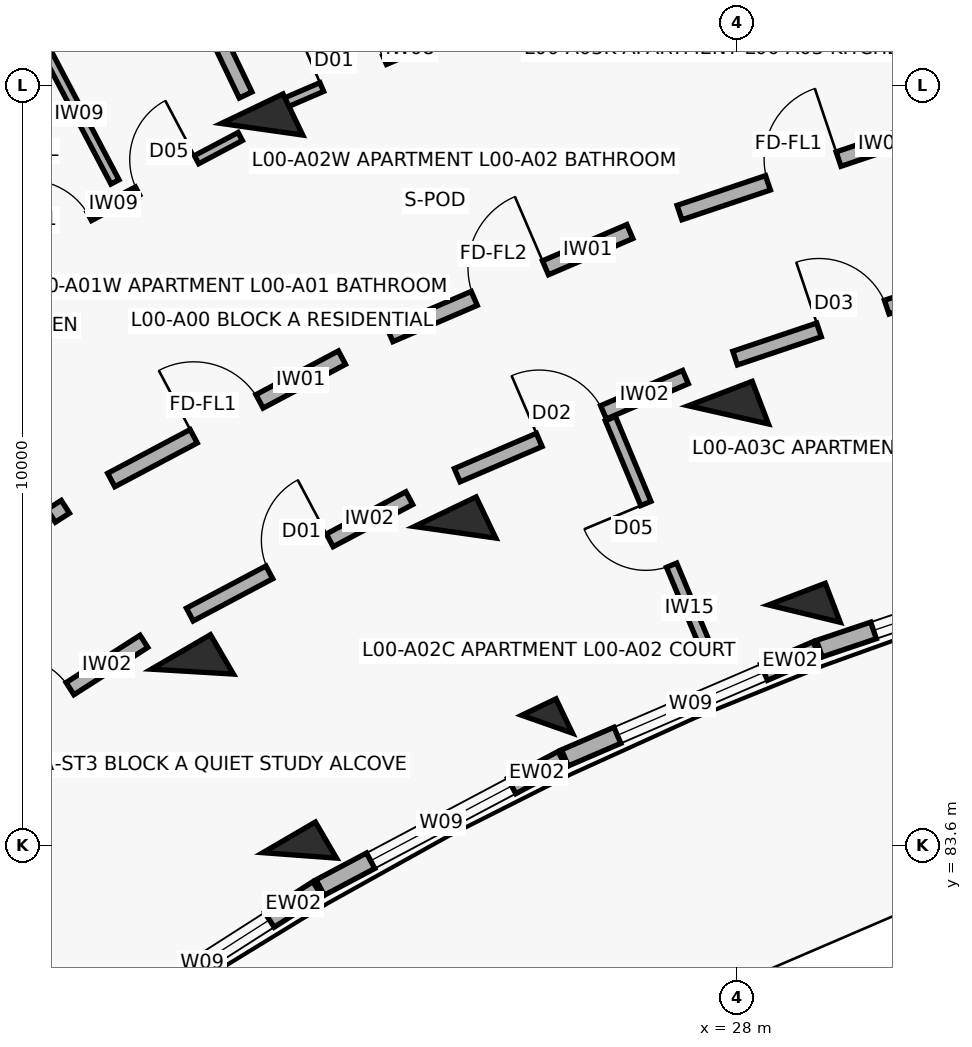
"""IFC4 building model, lengths in metres.
Left out: names, types, materials, properties, quantities, classifications, styles, units other than length and angle.
Written with IfcOpenShell. Run it as: python <this file> out.ifc"""

import sys

from ifc_helpers import new_model, si_unit, direction, frame, frame_2d, origin, origin_2d, place, context, subcontext, project, spatial, rectangle, extrude, element, fill, save


model = new_model("IFC4")
c1 = context("Model", 3, precision=1e-05, world=origin(), true_north=direction((0.0, 1.0)))
c2 = subcontext(c1, "Body", "Model", "MODEL_VIEW")
j1 = project(units=[si_unit("LENGTHUNIT", "METRE"), si_unit("PLANEANGLEUNIT", "RADIAN")], contexts=[c1])
p1 = place(None, origin())
s1 = spatial("IfcSite", under=j1, at=p1, CompositionType="ELEMENT")
p2 = place(p1, origin())
s2 = spatial("IfcBuilding", under=s1, at=p2, CompositionType="ELEMENT")
p3 = place(p2, origin())
s3 = spatial("IfcBuildingStorey", under=s2, at=p3, CompositionType="ELEMENT", Elevation=0.0)
p4 = place(p3, frame((22.249, 83.464, 0.0), z_axis=(0.0, 0.0, 1.0), x_axis=(-0.504226211181, 0.863571611366, 0.0)))
e1 = element("IfcColumn", 1, at=p4, inside=s3, PredefinedType="COLUMN", context=c2, shape_type="SweptSolid", body=[
    extrude(rectangle(XDim=0.55, YDim=0.8, at=origin_2d()), origin(), (0.0, 0.0, 1.0), 4.5),
])
p5 = place(p3, frame((20.837, 85.882, 0.0), z_axis=(0.0, 0.0, 1.0), x_axis=(-0.504226211181, 0.863571611366, 0.0)))
e2 = element("IfcColumn", 2, at=p5, inside=s3, PredefinedType="COLUMN", context=c2, shape_type="SweptSolid", body=[
    extrude(rectangle(XDim=0.6, YDim=0.9, at=origin_2d()), origin(), (0.0, 0.0, 1.0), 4.5),
])
p6 = place(p3, frame((25.504, 85.191, 0.0), z_axis=(0.0, 0.0, 1.0), x_axis=(-0.432085748802, 0.901832526405, 0.0)))
e3 = element("IfcColumn", 3, at=p6, inside=s3, PredefinedType="COLUMN", context=c2, shape_type="SweptSolid", body=[
    extrude(rectangle(XDim=0.5, YDim=0.5, at=origin_2d()), origin(), (0.0, 0.0, 1.0), 4.5),
])
for number, where, z_axis, x_axis in (
    (4, (24.294, 87.716, 0.0), (0.0, 0.0, 1.0), (-0.432, 0.902, 0.0)),
    (5, (21.754, 93.019, 0.0), (0.0, 0.0, 1.0), (-0.432, 0.902, 0.0)),
):
    element("IfcColumn", number, at=place(p3, frame(where, z_axis=z_axis, x_axis=x_axis)), inside=s3, PredefinedType="COLUMN", context=c2, shape_type="SweptSolid", body=[
        extrude(rectangle(XDim=0.6, YDim=0.9, at=origin_2d()), origin(), (0.0, 0.0, 1.0), 4.5),
    ])
p7 = place(p3, frame((28.889, 86.646, 0.0), z_axis=(0.0, 0.0, 1.0), x_axis=(-0.357064076459, 0.934079892355, 0.0)))
e6 = element("IfcColumn", 6, at=p7, inside=s3, PredefinedType="COLUMN", context=c2, shape_type="SweptSolid", body=[
    extrude(rectangle(XDim=0.55, YDim=0.8, at=origin_2d()), origin(), (0.0, 0.0, 1.0), 4.5),
])
p8 = place(p3, frame((27.889, 89.261, 0.0), z_axis=(0.0, 0.0, 1.0), x_axis=(-0.357064076459, 0.934079892355, 0.0)))
e7 = element("IfcColumn", 7, at=p8, inside=s3, PredefinedType="COLUMN", context=c2, shape_type="SweptSolid", body=[
    extrude(rectangle(XDim=0.6, YDim=0.9, at=origin_2d()), origin(), (0.0, 0.0, 1.0), 4.5),
])
p9 = place(p3, frame((19.449, 81.079, 0.0), z_axis=(0.0, 0.0, 1.0), x_axis=(0.84225540507, 0.539078688718, 0.0)))
e8 = element("IfcWall", 8, at=p9, inside=s3, PredefinedType="SOLIDWALL", context=c2, shape_type="SweptSolid", body=[
    extrude(rectangle(XDim=3.604, YDim=0.23, at=frame_2d((1.802, 0.0))), origin(), (0.0, 0.0, 1.0), 3.45),
])
p10 = place(p9, frame((0.752, 0.0, 0.32)))
e9 = element("IfcOpeningElement", 9, at=p10, cuts=e8, PredefinedType="OPENING", context=c2, shape_type="SweptSolid", body=[
    extrude(rectangle(XDim=2.1, YDim=1.65, at=frame_2d((1.05, 0.825))), frame((0.0, 0.125, 0.0), z_axis=(0.0, -1.0, 0.0), x_axis=(1.0, 0.0, 0.0)), (0.0, 0.0, 1.0), 0.25),
])
p11 = place(p3, frame((22.519, 83.042, 0.0), z_axis=(0.0, 0.0, 1.0), x_axis=(0.883438308286, 0.468547495407, 0.0)))
e10 = element("IfcWall", 10, at=p11, inside=s3, PredefinedType="SOLIDWALL", context=c2, shape_type="SweptSolid", body=[
    extrude(rectangle(XDim=3.604, YDim=0.23, at=frame_2d((1.802, 0.0))), origin(), (0.0, 0.0, 1.0), 3.45),
])
p12 = place(p11, frame((0.752, 0.0, 0.32)))
e11 = element("IfcOpeningElement", 11, at=p12, cuts=e10, PredefinedType="OPENING", context=c2, shape_type="SweptSolid", body=[
    extrude(rectangle(XDim=2.1, YDim=1.65, at=frame_2d((1.05, 0.825))), frame((0.0, 0.125, 0.0), z_axis=(0.0, -1.0, 0.0), x_axis=(1.0, 0.0, 0.0)), (0.0, 0.0, 1.0), 0.25),
])
p13 = place(p3, frame((25.739, 84.748, 0.0), z_axis=(0.0, 0.0, 1.0), x_axis=(0.918713438577, 0.394924825477, 0.0)))
e12 = element("IfcWall", 12, at=p13, inside=s3, PredefinedType="SOLIDWALL", context=c2, shape_type="SweptSolid", body=[
    extrude(rectangle(XDim=3.604, YDim=0.23, at=frame_2d((1.802, 0.0))), origin(), (0.0, 0.0, 1.0), 3.45),
])
p14 = place(p13, frame((0.752, 0.0, 0.32)))
e13 = element("IfcOpeningElement", 13, at=p14, cuts=e12, PredefinedType="OPENING", context=c2, shape_type="SweptSolid", body=[
    extrude(rectangle(XDim=2.1, YDim=1.65, at=frame_2d((1.05, 0.825))), frame((0.0, 0.125, 0.0), z_axis=(0.0, -1.0, 0.0), x_axis=(1.0, 0.0, 0.0)), (0.0, 0.0, 1.0), 0.25),
])
p15 = place(p3, frame((29.087, 86.185, 0.0), z_axis=(0.0, 0.0, 1.0), x_axis=(0.947880824442, 0.318625081649, 0.0)))
e14 = element("IfcWall", 14, at=p15, inside=s3, PredefinedType="SOLIDWALL", context=c2, shape_type="SweptSolid", body=[
    extrude(rectangle(XDim=3.604, YDim=0.23, at=frame_2d((1.802, 0.0))), origin(), (0.0, 0.0, 1.0), 3.45),
])
p16 = place(p15, frame((0.752, 0.0, 0.32)))
e15 = element("IfcOpeningElement", 15, at=p16, cuts=e14, PredefinedType="OPENING", context=c2, shape_type="SweptSolid", body=[
    extrude(rectangle(XDim=2.1, YDim=1.65, at=frame_2d((1.05, 0.825))), frame((0.0, 0.125, 0.0), z_axis=(0.0, -1.0, 0.0), x_axis=(1.0, 0.0, 0.0)), (0.0, 0.0, 1.0), 0.25),
])
p17 = place(p3, frame((16.272, 86.199, 0.0), z_axis=(0.0, 0.0, 1.0), x_axis=(0.842257205985, 0.539075874963, 0.0)))
e16 = element("IfcWall", 16, at=p17, inside=s3, PredefinedType="SOLIDWALL", context=c2, shape_type="SweptSolid", body=[
    extrude(rectangle(XDim=3.436, YDim=0.2, at=frame_2d((1.718, 0.0))), origin(), (0.0, 0.0, 1.0), 3.34),
])
p18 = place(p17, frame((0.28, 0.0, 0.0)))
e17 = element("IfcOpeningElement", 17, at=p18, cuts=e16, PredefinedType="OPENING", context=c2, shape_type="SweptSolid", body=[
    extrude(rectangle(XDim=1.12, YDim=2.15, at=frame_2d((0.56, 1.075))), frame((0.0, 0.11, 0.0), z_axis=(0.0, -1.0, 0.0), x_axis=(1.0, 0.0, 0.0)), (0.0, 0.0, 1.0), 0.22),
])
p19 = place(p17, frame((2.266, 0.0, 0.0)))
e18 = element("IfcOpeningElement", 18, at=p19, cuts=e16, PredefinedType="OPENING", context=c2, shape_type="SweptSolid", body=[
    extrude(rectangle(XDim=0.95, YDim=2.1, at=frame_2d((0.475, 1.05))), frame((0.0, 0.11, 0.0), z_axis=(0.0, -1.0, 0.0), x_axis=(1.0, 0.0, 0.0)), (0.0, 0.0, 1.0), 0.22),
])
p20 = place(p3, frame((17.447, 84.519, 0.0), z_axis=(0.0, 0.0, 1.0), x_axis=(0.842225276846, 0.539125758095, 0.0)))
e19 = element("IfcWall", 19, at=p20, inside=s3, PredefinedType="SOLIDWALL", context=c2, shape_type="SweptSolid", body=[
    extrude(rectangle(XDim=3.269, YDim=0.19, at=frame_2d((1.634, 0.0))), origin(), (0.0, 0.0, 1.0), 3.34),
])
p21 = place(p20, frame((1.154, 0.0, 0.0)))
e20 = element("IfcOpeningElement", 20, at=p21, cuts=e19, PredefinedType="OPENING", context=c2, shape_type="SweptSolid", body=[
    extrude(rectangle(XDim=0.96, YDim=2.1, at=frame_2d((0.48, 1.05))), frame((0.0, 0.105, 0.0), z_axis=(0.0, -1.0, 0.0), x_axis=(1.0, 0.0, 0.0)), (0.0, 0.0, 1.0), 0.21),
])
p22 = place(p3, frame((19.77, 88.404, 0.0), z_axis=(0.0, 0.0, 1.0), x_axis=(0.883410853063, 0.468599258099, 0.0)))
e21 = element("IfcWall", 21, at=p22, inside=s3, PredefinedType="SOLIDWALL", context=c2, shape_type="SweptSolid", body=[
    extrude(rectangle(XDim=3.436, YDim=0.2, at=frame_2d((1.718, 0.0))), origin(), (0.0, 0.0, 1.0), 3.34),
])
p23 = place(p22, frame((1.228, 0.0, 0.0)))
e22 = element("IfcOpeningElement", 22, at=p23, cuts=e21, PredefinedType="OPENING", context=c2, shape_type="SweptSolid", body=[
    extrude(rectangle(XDim=0.98, YDim=2.15, at=frame_2d((0.49, 1.075))), frame((0.0, 0.11, 0.0), z_axis=(0.0, -1.0, 0.0), x_axis=(1.0, 0.0, 0.0)), (0.0, 0.0, 1.0), 0.22),
])
p24 = place(p3, frame((20.804, 86.634, 0.0), z_axis=(0.0, 0.0, 1.0), x_axis=(0.883444301944, 0.468536194293, 0.0)))
e23 = element("IfcWall", 23, at=p24, inside=s3, PredefinedType="SOLIDWALL", context=c2, shape_type="SweptSolid", body=[
    extrude(rectangle(XDim=3.269, YDim=0.19, at=frame_2d((1.634, 0.0))), origin(), (0.0, 0.0, 1.0), 3.34),
])
p25 = place(p24, frame((1.184, 0.0, 0.0)))
e24 = element("IfcOpeningElement", 24, at=p25, cuts=e23, PredefinedType="OPENING", context=c2, shape_type="SweptSolid", body=[
    extrude(rectangle(XDim=0.9, YDim=2.1, at=frame_2d((0.45, 1.05))), frame((0.0, 0.105, 0.0), z_axis=(0.0, -1.0, 0.0), x_axis=(1.0, 0.0, 0.0)), (0.0, 0.0, 1.0), 0.21),
])
p26 = place(p3, frame((18.113, 91.144, 0.0), z_axis=(0.0, 0.0, 1.0), x_axis=(0.88341855112, 0.46858474531, 0.0)))
e25 = element("IfcWall", 25, at=p26, inside=s3, PredefinedType="PARTITIONING", context=c2, shape_type="SweptSolid", body=[
    extrude(rectangle(XDim=3.797, YDim=0.12, at=frame_2d((1.898, 0.0))), origin(), (0.0, 0.0, 1.0), 3.34),
])
p27 = place(p26, frame((0.65, 0.0, 0.0)))
e26 = element("IfcOpeningElement", 26, at=p27, cuts=e25, PredefinedType="OPENING", context=c2, shape_type="SweptSolid", body=[
    extrude(rectangle(XDim=0.9, YDim=2.1, at=frame_2d((0.45, 1.05))), frame((0.0, 0.07, 0.0), z_axis=(0.0, -1.0, 0.0), x_axis=(1.0, 0.0, 0.0)), (0.0, 0.0, 1.0), 0.14),
])
p28 = place(p26, frame((2.267, 0.0, 0.0)))
e27 = element("IfcOpeningElement", 27, at=p28, cuts=e25, PredefinedType="OPENING", context=c2, shape_type="SweptSolid", body=[
    extrude(rectangle(XDim=0.88, YDim=2.1, at=frame_2d((0.44, 1.05))), frame((0.0, 0.07, 0.0), z_axis=(0.0, -1.0, 0.0), x_axis=(1.0, 0.0, 0.0)), (0.0, 0.0, 1.0), 0.14),
])
p29 = place(p3, frame((19.819, 92.326, 0.0), z_axis=(0.0, 0.0, 1.0), x_axis=(-0.465849102717, 0.884864177995, 0.0)))
e28 = element("IfcWall", 28, at=p29, inside=s3, PredefinedType="PARTITIONING", context=c2, shape_type="SweptSolid", body=[
    extrude(rectangle(XDim=4.9, YDim=0.12, at=frame_2d((2.45, 0.0))), origin(), (0.0, 0.0, 1.0), 3.34),
])
p30 = place(p29, frame((2.025, 0.0, 0.0)))
e29 = element("IfcOpeningElement", 29, at=p30, cuts=e28, PredefinedType="OPENING", context=c2, shape_type="SweptSolid", body=[
    extrude(rectangle(XDim=0.85, YDim=2.1, at=frame_2d((0.425, 1.05))), frame((0.0, 0.07, 0.0), z_axis=(0.0, -1.0, 0.0), x_axis=(1.0, 0.0, 0.0)), (0.0, 0.0, 1.0), 0.14),
])
p31 = place(p3, frame((23.437, 90.316, 0.0), z_axis=(0.0, 0.0, 1.0), x_axis=(0.918718172399, 0.394913813008, 0.0)))
e30 = element("IfcWall", 30, at=p31, inside=s3, PredefinedType="SOLIDWALL", context=c2, shape_type="SweptSolid", body=[
    extrude(rectangle(XDim=3.436, YDim=0.2, at=frame_2d((1.718, 0.0))), origin(), (0.0, 0.0, 1.0), 3.34),
])
p32 = place(p31, frame((1.208, 0.0, 0.0)))
e31 = element("IfcOpeningElement", 31, at=p32, cuts=e30, PredefinedType="OPENING", context=c2, shape_type="SweptSolid", body=[
    extrude(rectangle(XDim=1.02, YDim=2.15, at=frame_2d((0.51, 1.075))), frame((0.0, 0.11, 0.0), z_axis=(0.0, -1.0, 0.0), x_axis=(1.0, 0.0, 0.0)), (0.0, 0.0, 1.0), 0.22),
])
p33 = place(p3, frame((24.322, 88.467, 0.0), z_axis=(0.0, 0.0, 1.0), x_axis=(0.918723391052, 0.394901672235, 0.0)))
e32 = element("IfcWall", 32, at=p33, inside=s3, PredefinedType="SOLIDWALL", context=c2, shape_type="SweptSolid", body=[
    extrude(rectangle(XDim=3.269, YDim=0.19, at=frame_2d((1.634, 0.0))), origin(), (0.0, 0.0, 1.0), 3.34),
])
p34 = place(p33, frame((1.174, 0.0, 0.0)))
e33 = element("IfcOpeningElement", 33, at=p34, cuts=e32, PredefinedType="OPENING", context=c2, shape_type="SweptSolid", body=[
    extrude(rectangle(XDim=0.92, YDim=2.1, at=frame_2d((0.46, 1.05))), frame((0.0, 0.105, 0.0), z_axis=(0.0, -1.0, 0.0), x_axis=(1.0, 0.0, 0.0)), (0.0, 0.0, 1.0), 0.21),
])
p35 = place(p3, frame((27.609, 86.166, 0.0), z_axis=(0.0, 0.0, 1.0), x_axis=(-0.385151143297, 0.922853507777, 0.0)))
e34 = element("IfcWall", 34, at=p35, inside=s3, PredefinedType="PARTITIONING", context=c2, shape_type="SweptSolid", body=[
    extrude(rectangle(XDim=3.3, YDim=0.145, at=frame_2d((1.65, 0.0))), origin(), (0.0, 0.0, 1.0), 3.34),
])
p36 = place(p35, frame((1.21, 0.0, 0.0)))
e35 = element("IfcOpeningElement", 35, at=p36, cuts=e34, PredefinedType="OPENING", context=c2, shape_type="SweptSolid", body=[
    extrude(rectangle(XDim=0.88, YDim=2.1, at=frame_2d((0.44, 1.05))), frame((0.0, 0.083, 0.0), z_axis=(0.0, -1.0, 0.0), x_axis=(1.0, 0.0, 0.0)), (0.0, 0.0, 1.0), 0.165),
])
p37 = place(p3, frame((21.943, 93.317, 0.0), z_axis=(0.0, 0.0, 1.0), x_axis=(0.918726854017, 0.394893615684, 0.0)))
e36 = element("IfcWall", 36, at=p37, inside=s3, PredefinedType="PARTITIONING", context=c2, shape_type="SweptSolid", body=[
    extrude(rectangle(XDim=3.81, YDim=0.125, at=frame_2d((1.905, 0.0))), origin(), (0.0, 0.0, 1.0), 3.34),
])
p38 = place(p37, frame((0.65, 0.0, 0.0)))
e37 = element("IfcOpeningElement", 37, at=p38, cuts=e36, PredefinedType="OPENING", context=c2, shape_type="SweptSolid", body=[
    extrude(rectangle(XDim=0.9, YDim=2.1, at=frame_2d((0.45, 1.05))), frame((0.0, 0.073, 0.0), z_axis=(0.0, -1.0, 0.0), x_axis=(1.0, 0.0, 0.0)), (0.0, 0.0, 1.0), 0.145),
])
p39 = place(p37, frame((2.28, 0.0, 0.0)))
e38 = element("IfcOpeningElement", 38, at=p39, cuts=e36, PredefinedType="OPENING", context=c2, shape_type="SweptSolid", body=[
    extrude(rectangle(XDim=0.88, YDim=2.1, at=frame_2d((0.44, 1.05))), frame((0.0, 0.073, 0.0), z_axis=(0.0, -1.0, 0.0), x_axis=(1.0, 0.0, 0.0)), (0.0, 0.0, 1.0), 0.145),
])
p40 = place(p3, frame((21.538, 93.469, 0.0), z_axis=(0.0, 0.0, 1.0), x_axis=(-0.432086898897, 0.901831975371, 0.0)))
e39 = element("IfcWall", 39, at=p40, inside=s3, PredefinedType="SOLIDWALL", context=c2, shape_type="SweptSolid", body=[
    extrude(rectangle(XDim=4.35, YDim=0.185, at=frame_2d((2.175, 0.0))), origin(), (0.0, 0.0, 1.0), 3.34),
])
p41 = place(p3, frame((27.247, 91.923, 0.0), z_axis=(0.0, 0.0, 1.0), x_axis=(0.947863007629, 0.318678080151, 0.0)))
e40 = element("IfcWall", 40, at=p41, inside=s3, PredefinedType="SOLIDWALL", context=c2, shape_type="SweptSolid", body=[
    extrude(rectangle(XDim=3.436, YDim=0.2, at=frame_2d((1.718, 0.0))), origin(), (0.0, 0.0, 1.0), 3.34),
])
p42 = place(p41, frame((1.228, 0.0, 0.0)))
e41 = element("IfcOpeningElement", 41, at=p42, cuts=e40, PredefinedType="OPENING", context=c2, shape_type="SweptSolid", body=[
    extrude(rectangle(XDim=0.98, YDim=2.15, at=frame_2d((0.49, 1.075))), frame((0.0, 0.11, 0.0), z_axis=(0.0, -1.0, 0.0), x_axis=(1.0, 0.0, 0.0)), (0.0, 0.0, 1.0), 0.22),
])
p43 = place(p3, frame((27.979, 90.008, 0.0), z_axis=(0.0, 0.0, 1.0), x_axis=(0.94787351033, 0.318646839643, 0.0)))
e42 = element("IfcWall", 42, at=p43, inside=s3, PredefinedType="SOLIDWALL", context=c2, shape_type="SweptSolid", body=[
    extrude(rectangle(XDim=3.269, YDim=0.19, at=frame_2d((1.634, 0.0))), origin(), (0.0, 0.0, 1.0), 3.34),
])
p44 = place(p43, frame((1.164, 0.0, 0.0)))
e43 = element("IfcOpeningElement", 43, at=p44, cuts=e42, PredefinedType="OPENING", context=c2, shape_type="SweptSolid", body=[
    extrude(rectangle(XDim=0.94, YDim=2.1, at=frame_2d((0.47, 1.05))), frame((0.0, 0.105, 0.0), z_axis=(0.0, -1.0, 0.0), x_axis=(1.0, 0.0, 0.0)), (0.0, 0.0, 1.0), 0.21),
])
p45 = place(p10, origin())
e44 = element("IfcWindow", 44, at=p45, inside=s3, PartitioningType="TRIPLE_PANEL_VERTICAL", PredefinedType="WINDOW", context=c2, shape_type="SweptSolid", body=[
    extrude(rectangle(XDim=2.1, YDim=1.65, at=frame_2d((1.05, 0.825))), frame((0.0, 0.03, 0.0), z_axis=(0.0, -1.0, 0.0), x_axis=(1.0, 0.0, 0.0)), (0.0, 0.0, 1.0), 0.06),
])
fill(e9, e44)
p46 = place(p12, origin())
e45 = element("IfcWindow", 45, at=p46, inside=s3, PartitioningType="TRIPLE_PANEL_VERTICAL", PredefinedType="WINDOW", context=c2, shape_type="SweptSolid", body=[
    extrude(rectangle(XDim=2.1, YDim=1.65, at=frame_2d((1.05, 0.825))), frame((0.0, 0.03, 0.0), z_axis=(0.0, -1.0, 0.0), x_axis=(1.0, 0.0, 0.0)), (0.0, 0.0, 1.0), 0.06),
])
fill(e11, e45)
p47 = place(p14, origin())
e46 = element("IfcWindow", 46, at=p47, inside=s3, PartitioningType="TRIPLE_PANEL_VERTICAL", PredefinedType="WINDOW", context=c2, shape_type="SweptSolid", body=[
    extrude(rectangle(XDim=2.1, YDim=1.65, at=frame_2d((1.05, 0.825))), frame((0.0, 0.03, 0.0), z_axis=(0.0, -1.0, 0.0), x_axis=(1.0, 0.0, 0.0)), (0.0, 0.0, 1.0), 0.06),
])
fill(e13, e46)
p48 = place(p16, origin())
e47 = element("IfcWindow", 47, at=p48, inside=s3, PartitioningType="TRIPLE_PANEL_VERTICAL", PredefinedType="WINDOW", context=c2, shape_type="SweptSolid", body=[
    extrude(rectangle(XDim=2.1, YDim=1.65, at=frame_2d((1.05, 0.825))), frame((0.0, 0.03, 0.0), z_axis=(0.0, -1.0, 0.0), x_axis=(1.0, 0.0, 0.0)), (0.0, 0.0, 1.0), 0.06),
])
fill(e15, e47)
p49 = place(p19, origin())
e48 = element("IfcDoor", 48, at=p49, inside=s3, OperationType="SINGLE_SWING_RIGHT", PredefinedType="DOOR", context=c2, shape_type="SweptSolid", body=[
    extrude(rectangle(XDim=0.95, YDim=2.1, at=frame_2d((0.475, 1.05))), frame((0.0, 0.025, 0.0), z_axis=(0.0, -1.0, 0.0), x_axis=(1.0, 0.0, 0.0)), (0.0, 0.0, 1.0), 0.05),
])
fill(e18, e48)
p50 = place(p21, origin())
e49 = element("IfcDoor", 49, at=p50, inside=s3, OperationType="SINGLE_SWING_LEFT", PredefinedType="DOOR", context=c2, shape_type="SweptSolid", body=[
    extrude(rectangle(XDim=0.96, YDim=2.1, at=frame_2d((0.48, 1.05))), frame((0.0, 0.025, 0.0), z_axis=(0.0, -1.0, 0.0), x_axis=(1.0, 0.0, 0.0)), (0.0, 0.0, 1.0), 0.05),
])
fill(e20, e49)
p51 = place(p23, origin())
e50 = element("IfcDoor", 50, at=p51, inside=s3, OperationType="SINGLE_SWING_LEFT", PredefinedType="DOOR", context=c2, shape_type="SweptSolid", body=[
    extrude(rectangle(XDim=0.98, YDim=2.15, at=frame_2d((0.49, 1.075))), frame((0.0, 0.025, 0.0), z_axis=(0.0, -1.0, 0.0), x_axis=(1.0, 0.0, 0.0)), (0.0, 0.0, 1.0), 0.05),
])
fill(e22, e50)
p52 = place(p25, origin())
e51 = element("IfcDoor", 51, at=p52, inside=s3, OperationType="SINGLE_SWING_RIGHT", PredefinedType="DOOR", context=c2, shape_type="SweptSolid", body=[
    extrude(rectangle(XDim=0.9, YDim=2.1, at=frame_2d((0.45, 1.05))), frame((0.0, 0.025, 0.0), z_axis=(0.0, -1.0, 0.0), x_axis=(1.0, 0.0, 0.0)), (0.0, 0.0, 1.0), 0.05),
])
fill(e24, e51)
p53 = place(p27, origin())
e52 = element("IfcDoor", 52, at=p53, inside=s3, OperationType="SINGLE_SWING_LEFT", PredefinedType="DOOR", context=c2, shape_type="SweptSolid", body=[
    extrude(rectangle(XDim=0.9, YDim=2.1, at=frame_2d((0.45, 1.05))), frame((0.0, 0.025, 0.0), z_axis=(0.0, -1.0, 0.0), x_axis=(1.0, 0.0, 0.0)), (0.0, 0.0, 1.0), 0.05),
])
fill(e26, e52)
p54 = place(p28, origin())
e53 = element("IfcDoor", 53, at=p54, inside=s3, OperationType="SINGLE_SWING_RIGHT", PredefinedType="DOOR", context=c2, shape_type="SweptSolid", body=[
    extrude(rectangle(XDim=0.88, YDim=2.1, at=frame_2d((0.44, 1.05))), frame((0.0, 0.025, 0.0), z_axis=(0.0, -1.0, 0.0), x_axis=(1.0, 0.0, 0.0)), (0.0, 0.0, 1.0), 0.05),
])
fill(e27, e53)
p55 = place(p32, origin())
e54 = element("IfcDoor", 54, at=p55, inside=s3, OperationType="SINGLE_SWING_RIGHT", PredefinedType="DOOR", context=c2, shape_type="SweptSolid", body=[
    extrude(rectangle(XDim=1.02, YDim=2.15, at=frame_2d((0.51, 1.075))), frame((0.0, 0.025, 0.0), z_axis=(0.0, -1.0, 0.0), x_axis=(1.0, 0.0, 0.0)), (0.0, 0.0, 1.0), 0.05),
])
fill(e31, e54)
p56 = place(p34, origin())
e55 = element("IfcDoor", 55, at=p56, inside=s3, OperationType="SINGLE_SWING_LEFT", PredefinedType="DOOR", context=c2, shape_type="SweptSolid", body=[
    extrude(rectangle(XDim=0.92, YDim=2.1, at=frame_2d((0.46, 1.05))), frame((0.0, 0.025, 0.0), z_axis=(0.0, -1.0, 0.0), x_axis=(1.0, 0.0, 0.0)), (0.0, 0.0, 1.0), 0.05),
])
fill(e33, e55)
p57 = place(p36, origin())
e56 = element("IfcDoor", 56, at=p57, inside=s3, OperationType="SINGLE_SWING_RIGHT", PredefinedType="DOOR", context=c2, shape_type="SweptSolid", body=[
    extrude(rectangle(XDim=0.88, YDim=2.1, at=frame_2d((0.44, 1.05))), frame((0.0, 0.025, 0.0), z_axis=(0.0, -1.0, 0.0), x_axis=(1.0, 0.0, 0.0)), (0.0, 0.0, 1.0), 0.05),
])
fill(e35, e56)
p58 = place(p38, origin())
e57 = element("IfcDoor", 57, at=p58, inside=s3, OperationType="SINGLE_SWING_LEFT", PredefinedType="DOOR", context=c2, shape_type="SweptSolid", body=[
    extrude(rectangle(XDim=0.9, YDim=2.1, at=frame_2d((0.45, 1.05))), frame((0.0, 0.025, 0.0), z_axis=(0.0, -1.0, 0.0), x_axis=(1.0, 0.0, 0.0)), (0.0, 0.0, 1.0), 0.05),
])
fill(e37, e57)
p59 = place(p42, origin())
e58 = element("IfcDoor", 58, at=p59, inside=s3, OperationType="SINGLE_SWING_RIGHT", PredefinedType="DOOR", context=c2, shape_type="SweptSolid", body=[
    extrude(rectangle(XDim=0.98, YDim=2.15, at=frame_2d((0.49, 1.075))), frame((0.0, 0.025, 0.0), z_axis=(0.0, -1.0, 0.0), x_axis=(1.0, 0.0, 0.0)), (0.0, 0.0, 1.0), 0.05),
])
fill(e41, e58)
p60 = place(p44, origin())
e59 = element("IfcDoor", 59, at=p60, inside=s3, OperationType="SINGLE_SWING_LEFT", PredefinedType="DOOR", context=c2, shape_type="SweptSolid", body=[
    extrude(rectangle(XDim=0.94, YDim=2.1, at=frame_2d((0.47, 1.05))), frame((0.0, 0.025, 0.0), z_axis=(0.0, -1.0, 0.0), x_axis=(1.0, 0.0, 0.0)), (0.0, 0.0, 1.0), 0.05),
])
fill(e43, e59)
save(model, sys.argv[1])
